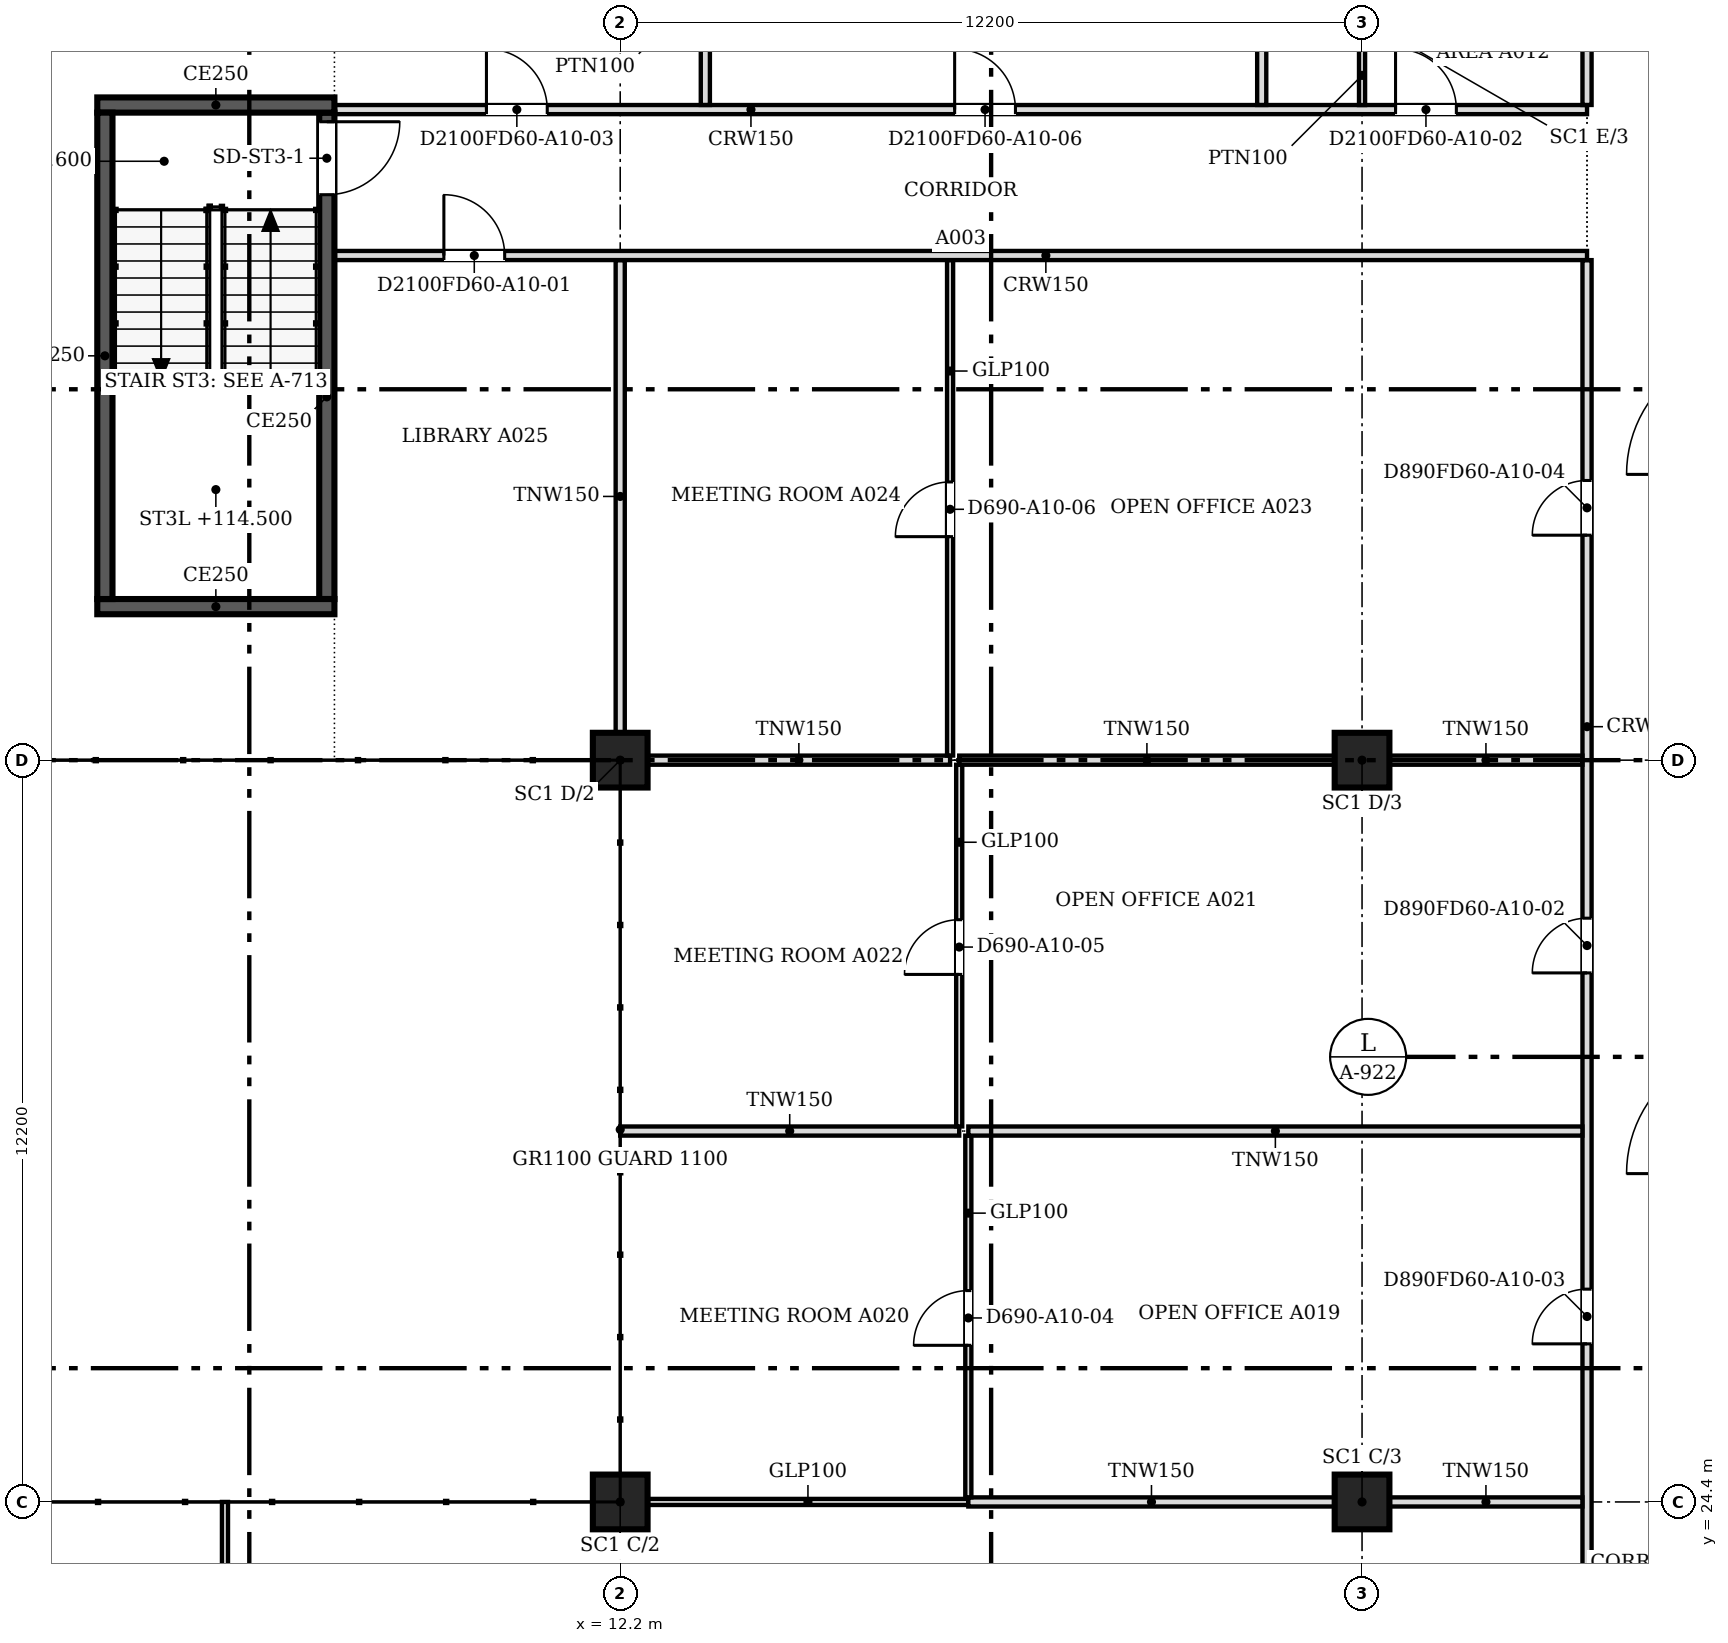
"""IFC4 building model, lengths in metres.
Left out: names, types, materials, properties, quantities, classifications, styles, units other than length and angle.
Written with IfcOpenShell. Run it as: python <this file> out.ifc"""

import sys

from ifc_helpers import new_model, si_unit, direction, frame, frame_2d, origin, origin_2d, place, context, subcontext, project, spatial, rectangle, extrude, source, transform, mapped, element, fill, save


model = new_model("IFC4")
c1 = context("Model", 3, precision=1e-05, world=origin(), true_north=direction((0.0, 1.0)))
c2 = subcontext(c1, "Body", "Model", "MODEL_VIEW")
j1 = project(units=[si_unit("LENGTHUNIT", "METRE"), si_unit("PLANEANGLEUNIT", "RADIAN")], contexts=[c1])
p1 = place(None, origin())
s1 = spatial("IfcSite", under=j1, at=p1, CompositionType="ELEMENT")
p2 = place(p1, origin())
s2 = spatial("IfcBuilding", under=s1, at=p2, CompositionType="ELEMENT")
p3 = place(p2, frame((0.0, 0.0, 112.6)))
s3 = spatial("IfcBuildingStorey", under=s2, at=p3, CompositionType="ELEMENT", Elevation=112.6)
for number, where, z_axis, x_axis in (
    (1, (12.2, 24.4, 0.0), (0.0, 0.0, 1.0), (1.0, 0.0, 0.0)),
    (2, (12.2, 36.6, 0.0), (0.0, 0.0, 1.0), (1.0, 0.0, 0.0)),
    (3, (24.4, 24.4, 0.0), (0.0, 0.0, 1.0), (1.0, 0.0, 0.0)),
    (4, (24.4, 36.6, 0.0), (0.0, 0.0, 1.0), (1.0, 0.0, 0.0)),
):
    element("IfcColumn", number, at=place(p3, frame(where, z_axis=z_axis, x_axis=x_axis)), inside=s3, PredefinedType="COLUMN", context=c2, shape_type="SweptSolid", body=[
        extrude(rectangle(XDim=0.9, YDim=0.9, at=origin_2d()), origin(), (0.0, 0.0, 1.0), 3.6),
    ])
p4 = place(p3, frame((7.5, 39.125, 0.0), z_axis=(0.0, 0.0, 1.0), x_axis=(-1.0, 0.0, 0.0)))
e5 = element("IfcWall", 5, at=p4, inside=s3, PredefinedType="SOLIDWALL", context=c2, shape_type="SweptSolid", body=[
    extrude(rectangle(XDim=3.9, YDim=0.25, at=frame_2d((1.95, 0.0))), origin(), (0.0, 0.0, 1.0), 3.8),
])
p5 = place(p3, frame((3.725, 39.25, 0.0), z_axis=(0.0, 0.0, 1.0), x_axis=(0.0, 1.0, 0.0)))
e6 = element("IfcWall", 6, at=p5, inside=s3, PredefinedType="SOLIDWALL", context=c2, shape_type="SweptSolid", body=[
    extrude(rectangle(XDim=8.0, YDim=0.25, at=frame_2d((4.0, 0.0))), origin(), (0.0, 0.0, 1.0), 3.8),
])
p6 = place(p3, frame((3.6, 47.375, 0.0), z_axis=(0.0, 0.0, 1.0), x_axis=(1.0, 0.0, 0.0)))
e7 = element("IfcWall", 7, at=p6, inside=s3, PredefinedType="SOLIDWALL", context=c2, shape_type="SweptSolid", body=[
    extrude(rectangle(XDim=3.9, YDim=0.25, at=frame_2d((1.95, 0.0))), origin(), (0.0, 0.0, 1.0), 3.8),
])
p7 = place(p3, frame((7.375, 47.25, 0.0), z_axis=(0.0, 0.0, 1.0), x_axis=(0.0, -1.0, 0.0)))
e8 = element("IfcWall", 8, at=p7, inside=s3, PredefinedType="SOLIDWALL", context=c2, shape_type="SweptSolid", body=[
    extrude(rectangle(XDim=8.0, YDim=0.25, at=frame_2d((4.0, 0.0))), origin(), (0.0, 0.0, 1.0), 3.8),
])
m1 = source(origin(), c2, "Body", "SweptSolid", [
    extrude(rectangle(XDim=1.2, YDim=2.1, at=frame_2d((0.6, 1.05))), frame((0.0, 0.135, 0.0), z_axis=(0.0, -1.0, 0.0), x_axis=(1.0, 0.0, 0.0)), (0.0, 0.0, 1.0), 0.27),
])
p8 = place(p7, frame((0.15, 0.0, 0.0)))
e9 = element("IfcOpeningElement", 9, at=p8, cuts=e8, PredefinedType="OPENING", context=c2, shape_type="MappedRepresentation", body=[
    mapped(m1, transform((0.0, 0.0, 0.0), scale=1.0)),
])
p9 = place(p3, frame((28.1, 18.8, 0.0), z_axis=(0.0, 0.0, 1.0), x_axis=(0.0, 1.0, 0.0)))
e10 = element("IfcWall", 10, at=p9, inside=s3, PredefinedType="PARTITIONING", context=c2, shape_type="SweptSolid", body=[
    extrude(rectangle(XDim=26.024, YDim=0.15, at=frame_2d((13.012, 0.0))), origin(), (0.0, 0.0, 1.0), 3.067),
])
m2 = source(origin(), c2, "Body", "SweptSolid", [
    extrude(rectangle(XDim=0.9, YDim=2.1, at=frame_2d((0.45, 1.05))), frame((0.0, 0.085, 0.0), z_axis=(0.0, -1.0, 0.0), x_axis=(1.0, 0.0, 0.0)), (0.0, 0.0, 1.0), 0.17),
])
p10 = place(p9, frame((1.1, 0.0, 0.0)))
e11 = element("IfcOpeningElement", 11, at=p10, cuts=e10, PredefinedType="OPENING", context=c2, shape_type="MappedRepresentation", body=[
    mapped(m2, transform((0.0, 0.0, 0.0), scale=1.0)),
])
p11 = place(p9, frame((14.301, 0.0, 0.0)))
e12 = element("IfcOpeningElement", 12, at=p11, cuts=e10, PredefinedType="OPENING", context=c2, shape_type="MappedRepresentation", body=[
    mapped(m2, transform((0.0, 0.0, 0.0), scale=1.0)),
])
p12 = place(p9, frame((8.2, 0.0, 0.0)))
e13 = element("IfcOpeningElement", 13, at=p12, cuts=e10, PredefinedType="OPENING", context=c2, shape_type="MappedRepresentation", body=[
    mapped(m2, transform((0.0, 0.0, 0.0), scale=1.0)),
])
p13 = place(p9, frame((21.5, 0.0, 0.0)))
e14 = element("IfcOpeningElement", 14, at=p13, cuts=e10, PredefinedType="OPENING", context=c2, shape_type="MappedRepresentation", body=[
    mapped(m2, transform((0.0, 0.0, 0.0), scale=1.0)),
])
p14 = place(p3, frame((5.7, 18.99, 0.0), z_axis=(0.0, 0.0, 1.0), x_axis=(0.0, 1.0, 0.0)))
e15 = element("IfcWall", 15, at=p14, inside=s3, PredefinedType="PARTITIONING", context=c2, shape_type="SweptSolid", body=[
    extrude(rectangle(XDim=5.41, YDim=0.1, at=frame_2d((2.705, 0.0))), origin(), (0.0, 0.0, 1.0), 3.067),
])
m3 = source(origin(), c2, "Body", "SweptSolid", [
    extrude(rectangle(XDim=0.9, YDim=2.1, at=frame_2d((0.45, 1.05))), frame((0.0, 0.06, 0.0), z_axis=(0.0, -1.0, 0.0), x_axis=(1.0, 0.0, 0.0)), (0.0, 0.0, 1.0), 0.12),
])
p15 = place(p14, frame((2.3, 0.0, 0.0)))
e16 = element("IfcOpeningElement", 16, at=p15, cuts=e15, PredefinedType="OPENING", context=c2, shape_type="MappedRepresentation", body=[
    mapped(m3, transform((0.0, 0.0, 0.0), scale=1.0)),
])
p16 = place(p3, frame((12.651, 24.4, 0.0), z_axis=(0.0, 0.0, 1.0), x_axis=(1.0, 0.0, 0.0)))
e17 = element("IfcWall", 17, at=p16, inside=s3, PredefinedType="PARTITIONING", context=c2, shape_type="SweptSolid", body=[
    extrude(rectangle(XDim=5.273, YDim=0.1, at=frame_2d((2.637, 0.0))), origin(), (0.0, 0.0, 1.0), 3.067),
])
p17 = place(p3, frame((17.925, 24.4, 0.0), z_axis=(0.0, 0.0, 1.0), x_axis=(1.0, 0.0, 0.0)))
e18 = element("IfcWall", 18, at=p17, inside=s3, PredefinedType="PARTITIONING", context=c2, shape_type="SweptSolid", body=[
    extrude(rectangle(XDim=6.024, YDim=0.15, at=frame_2d((3.012, 0.0))), origin(), (0.0, 0.0, 1.0), 3.067),
])
p18 = place(p3, frame((24.851, 24.4, 0.0), z_axis=(0.0, 0.0, 1.0), x_axis=(1.0, 0.0, 0.0)))
e19 = element("IfcWall", 19, at=p18, inside=s3, PredefinedType="PARTITIONING", context=c2, shape_type="SweptSolid", body=[
    extrude(rectangle(XDim=3.173, YDim=0.15, at=frame_2d((1.586, 0.0))), origin(), (0.0, 0.0, 1.0), 3.067),
])
p19 = place(p3, frame((17.925, 24.476, 0.0), z_axis=(0.0, 0.0, 1.0), x_axis=(0.0, 1.0, 0.0)))
e20 = element("IfcWall", 20, at=p19, inside=s3, PredefinedType="PARTITIONING", context=c2, shape_type="SweptSolid", body=[
    extrude(rectangle(XDim=5.948, YDim=0.1, at=frame_2d((2.974, 0.0))), origin(), (0.0, 0.0, 1.0), 3.067),
])
p20 = place(p19, frame((2.5, 0.0, 0.0)))
e21 = element("IfcOpeningElement", 21, at=p20, cuts=e20, PredefinedType="OPENING", context=c2, shape_type="MappedRepresentation", body=[
    mapped(m3, transform((0.0, 0.0, 0.0), scale=1.0)),
])
p21 = place(p3, frame((12.2, 30.5, 0.0), z_axis=(0.0, 0.0, 1.0), x_axis=(1.0, 0.0, 0.0)))
e22 = element("IfcWall", 22, at=p21, inside=s3, PredefinedType="PARTITIONING", context=c2, shape_type="SweptSolid", body=[
    extrude(rectangle(XDim=5.575, YDim=0.15, at=frame_2d((2.788, 0.0))), origin(), (0.0, 0.0, 1.0), 3.067),
])
p22 = place(p3, frame((17.925, 30.5, 0.0), z_axis=(0.0, 0.0, 1.0), x_axis=(1.0, 0.0, 0.0)))
e23 = element("IfcWall", 23, at=p22, inside=s3, PredefinedType="PARTITIONING", context=c2, shape_type="SweptSolid", body=[
    extrude(rectangle(XDim=10.099, YDim=0.15, at=frame_2d((5.049, 0.0))), origin(), (0.0, 0.0, 1.0), 3.067),
])
p23 = place(p3, frame((17.775, 30.576, 0.0), z_axis=(0.0, 0.0, 1.0), x_axis=(0.0, 1.0, 0.0)))
e24 = element("IfcWall", 24, at=p23, inside=s3, PredefinedType="PARTITIONING", context=c2, shape_type="SweptSolid", body=[
    extrude(rectangle(XDim=5.948, YDim=0.1, at=frame_2d((2.974, 0.0))), origin(), (0.0, 0.0, 1.0), 3.067),
])
p24 = place(p23, frame((2.5, 0.0, 0.0)))
e25 = element("IfcOpeningElement", 25, at=p24, cuts=e24, PredefinedType="OPENING", context=c2, shape_type="MappedRepresentation", body=[
    mapped(m3, transform((0.0, 0.0, 0.0), scale=1.0)),
])
p25 = place(p3, frame((12.651, 36.6, 0.0), z_axis=(0.0, 0.0, 1.0), x_axis=(1.0, 0.0, 0.0)))
e26 = element("IfcWall", 26, at=p25, inside=s3, PredefinedType="PARTITIONING", context=c2, shape_type="SweptSolid", body=[
    extrude(rectangle(XDim=4.974, YDim=0.15, at=frame_2d((2.487, 0.0))), origin(), (0.0, 0.0, 1.0), 3.067),
])
p26 = place(p3, frame((17.775, 36.6, 0.0), z_axis=(0.0, 0.0, 1.0), x_axis=(1.0, 0.0, 0.0)))
e27 = element("IfcWall", 27, at=p26, inside=s3, PredefinedType="PARTITIONING", context=c2, shape_type="SweptSolid", body=[
    extrude(rectangle(XDim=6.174, YDim=0.15, at=frame_2d((3.087, 0.0))), origin(), (0.0, 0.0, 1.0), 3.067),
])
p27 = place(p3, frame((24.851, 36.6, 0.0), z_axis=(0.0, 0.0, 1.0), x_axis=(1.0, 0.0, 0.0)))
e28 = element("IfcWall", 28, at=p27, inside=s3, PredefinedType="PARTITIONING", context=c2, shape_type="SweptSolid", body=[
    extrude(rectangle(XDim=3.173, YDim=0.15, at=frame_2d((1.586, 0.0))), origin(), (0.0, 0.0, 1.0), 3.067),
])
p28 = place(p3, frame((17.625, 36.676, 0.0), z_axis=(0.0, 0.0, 1.0), x_axis=(0.0, 1.0, 0.0)))
e29 = element("IfcWall", 29, at=p28, inside=s3, PredefinedType="PARTITIONING", context=c2, shape_type="SweptSolid", body=[
    extrude(rectangle(XDim=8.148, YDim=0.1, at=frame_2d((4.074, 0.0))), origin(), (0.0, 0.0, 1.0), 3.067),
])
p29 = place(p28, frame((3.6, 0.0, 0.0)))
e30 = element("IfcOpeningElement", 30, at=p29, cuts=e29, PredefinedType="OPENING", context=c2, shape_type="MappedRepresentation", body=[
    mapped(m3, transform((0.0, 0.0, 0.0), scale=1.0)),
])
p30 = place(p3, frame((12.2, 37.051, 0.0), z_axis=(0.0, 0.0, 1.0), x_axis=(0.0, 1.0, 0.0)))
e31 = element("IfcWall", 31, at=p30, inside=s3, PredefinedType="PARTITIONING", context=c2, shape_type="SweptSolid", body=[
    extrude(rectangle(XDim=7.773, YDim=0.15, at=frame_2d((3.886, 0.0))), origin(), (0.0, 0.0, 1.0), 3.067),
])
p31 = place(p3, frame((28.1, 44.9, 0.0), z_axis=(0.0, 0.0, 1.0), x_axis=(-1.0, 0.0, 0.0)))
e32 = element("IfcWall", 32, at=p31, inside=s3, PredefinedType="PARTITIONING", context=c2, shape_type="SweptSolid", body=[
    extrude(rectangle(XDim=20.6, YDim=0.15, at=frame_2d((10.3, 0.0))), origin(), (0.0, 0.0, 1.0), 3.067),
])
m4 = source(origin(), c2, "Body", "SweptSolid", [
    extrude(rectangle(XDim=1.0, YDim=2.1, at=frame_2d((0.5, 1.05))), frame((0.0, 0.085, 0.0), z_axis=(0.0, -1.0, 0.0), x_axis=(1.0, 0.0, 0.0)), (0.0, 0.0, 1.0), 0.17),
])
p32 = place(p31, frame((17.8, 0.0, 0.0)))
e33 = element("IfcOpeningElement", 33, at=p32, cuts=e32, PredefinedType="OPENING", context=c2, shape_type="MappedRepresentation", body=[
    mapped(m4, transform((0.0, 0.0, 0.0), scale=1.0)),
])
p33 = place(p3, frame((7.5, 47.3, 0.0), z_axis=(0.0, 0.0, 1.0), x_axis=(1.0, 0.0, 0.0)))
e34 = element("IfcWall", 34, at=p33, inside=s3, PredefinedType="PARTITIONING", context=c2, shape_type="SweptSolid", body=[
    extrude(rectangle(XDim=20.6, YDim=0.15, at=frame_2d((10.3, 0.0))), origin(), (0.0, 0.0, 1.0), 3.067),
])
p34 = place(p33, frame((17.451, 0.0, 0.0)))
e35 = element("IfcOpeningElement", 35, at=p34, cuts=e34, PredefinedType="OPENING", context=c2, shape_type="MappedRepresentation", body=[
    mapped(m4, transform((0.0, 0.0, 0.0), scale=1.0)),
])
p35 = place(p33, frame((2.5, 0.0, 0.0)))
e36 = element("IfcOpeningElement", 36, at=p35, cuts=e34, PredefinedType="OPENING", context=c2, shape_type="MappedRepresentation", body=[
    mapped(m4, transform((0.0, 0.0, 0.0), scale=1.0)),
])
p36 = place(p33, frame((10.2, 0.0, 0.0)))
e37 = element("IfcOpeningElement", 37, at=p36, cuts=e34, PredefinedType="OPENING", context=c2, shape_type="MappedRepresentation", body=[
    mapped(m4, transform((0.0, 0.0, 0.0), scale=1.0)),
])
p37 = place(p3, frame((13.6, 47.376, 0.0), z_axis=(0.0, 0.0, 1.0), x_axis=(0.0, 1.0, 0.0)))
e38 = element("IfcWall", 38, at=p37, inside=s3, PredefinedType="PARTITIONING", context=c2, shape_type="SweptSolid", body=[
    extrude(rectangle(XDim=3.498, YDim=0.15, at=frame_2d((1.749, 0.0))), origin(), (0.0, 0.0, 1.0), 3.067),
])
p38 = place(p3, frame((22.75, 47.376, 0.0), z_axis=(0.0, 0.0, 1.0), x_axis=(0.0, 1.0, 0.0)))
e39 = element("IfcWall", 39, at=p38, inside=s3, PredefinedType="PARTITIONING", context=c2, shape_type="SweptSolid", body=[
    extrude(rectangle(XDim=2.948, YDim=0.15, at=frame_2d((1.474, 0.0))), origin(), (0.0, 0.0, 1.0), 3.067),
])
p39 = place(p3, frame((28.1, 47.376, 0.0), z_axis=(0.0, 0.0, 1.0), x_axis=(0.0, 1.0, 0.0)))
e40 = element("IfcWall", 40, at=p39, inside=s3, PredefinedType="PARTITIONING", context=c2, shape_type="SweptSolid", body=[
    extrude(rectangle(XDim=3.748, YDim=0.15, at=frame_2d((1.874, 0.0))), origin(), (0.0, 0.0, 1.0), 3.067),
])
p40 = place(p3, frame((24.4, 48.35, 0.0), z_axis=(0.0, 0.0, 1.0), x_axis=(0.0, -1.0, 0.0)))
e41 = element("IfcWall", 41, at=p40, inside=s3, PredefinedType="PARTITIONING", context=c2, shape_type="SweptSolid", body=[
    extrude(rectangle(XDim=0.975, YDim=0.1, at=frame_2d((0.488, 0.0))), origin(), (0.0, 0.0, 1.0), 3.067),
])
m5 = source(origin(), c2, "Body", "SweptSolid", [
    extrude(rectangle(XDim=1.2, YDim=2.1, at=frame_2d((0.6, 1.05))), frame((0.0, 0.025, 0.0), z_axis=(0.0, -1.0, 0.0), x_axis=(1.0, 0.0, 0.0)), (0.0, 0.0, 1.0), 0.05),
])
p41 = place(p8, origin())
e42 = element("IfcDoor", 42, at=p41, inside=s3, OperationType="SINGLE_SWING_LEFT", PredefinedType="DOOR", context=c2, shape_type="MappedRepresentation", body=[
    mapped(m5, transform((0.0, 0.0, 0.0), scale=1.0)),
])
fill(e9, e42)
m6 = source(origin(), c2, "Body", "SweptSolid", [
    extrude(rectangle(XDim=1.0, YDim=2.1, at=frame_2d((0.5, 1.05))), frame((0.0, 0.025, 0.0), z_axis=(0.0, -1.0, 0.0), x_axis=(1.0, 0.0, 0.0)), (0.0, 0.0, 1.0), 0.05),
])
p42 = place(p32, origin())
e43 = element("IfcDoor", 43, at=p42, inside=s3, OperationType="SINGLE_SWING_RIGHT", PredefinedType="DOOR", context=c2, shape_type="MappedRepresentation", body=[
    mapped(m6, transform((0.0, 0.0, 0.0), scale=1.0)),
])
fill(e33, e43)
p43 = place(p34, origin())
e44 = element("IfcDoor", 44, at=p43, inside=s3, OperationType="SINGLE_SWING_LEFT", PredefinedType="DOOR", context=c2, shape_type="MappedRepresentation", body=[
    mapped(m6, transform((0.0, 0.0, 0.0), scale=1.0)),
])
fill(e35, e44)
m7 = source(origin(), c2, "Body", "SweptSolid", [
    extrude(rectangle(XDim=0.9, YDim=2.1, at=frame_2d((0.45, 1.05))), frame((0.0, 0.025, 0.0), z_axis=(0.0, -1.0, 0.0), x_axis=(1.0, 0.0, 0.0)), (0.0, 0.0, 1.0), 0.05),
])
p44 = place(p20, origin())
e45 = element("IfcDoor", 45, at=p44, inside=s3, OperationType="SINGLE_SWING_LEFT", PredefinedType="DOOR", context=c2, shape_type="MappedRepresentation", body=[
    mapped(m7, transform((0.0, 0.0, 0.0), scale=1.0)),
])
fill(e21, e45)
p45 = place(p24, origin())
e46 = element("IfcDoor", 46, at=p45, inside=s3, OperationType="SINGLE_SWING_LEFT", PredefinedType="DOOR", context=c2, shape_type="MappedRepresentation", body=[
    mapped(m7, transform((0.0, 0.0, 0.0), scale=1.0)),
])
fill(e25, e46)
p46 = place(p11, origin())
e47 = element("IfcDoor", 47, at=p46, inside=s3, OperationType="SINGLE_SWING_LEFT", PredefinedType="DOOR", context=c2, shape_type="MappedRepresentation", body=[
    mapped(m7, transform((0.0, 0.0, 0.0), scale=1.0)),
])
fill(e12, e47)
p47 = place(p35, origin())
e48 = element("IfcDoor", 48, at=p47, inside=s3, OperationType="SINGLE_SWING_LEFT", PredefinedType="DOOR", context=c2, shape_type="MappedRepresentation", body=[
    mapped(m6, transform((0.0, 0.0, 0.0), scale=1.0)),
])
fill(e36, e48)
p48 = place(p12, origin())
e49 = element("IfcDoor", 49, at=p48, inside=s3, OperationType="SINGLE_SWING_LEFT", PredefinedType="DOOR", context=c2, shape_type="MappedRepresentation", body=[
    mapped(m7, transform((0.0, 0.0, 0.0), scale=1.0)),
])
fill(e13, e49)
p49 = place(p29, origin())
e50 = element("IfcDoor", 50, at=p49, inside=s3, OperationType="SINGLE_SWING_LEFT", PredefinedType="DOOR", context=c2, shape_type="MappedRepresentation", body=[
    mapped(m7, transform((0.0, 0.0, 0.0), scale=1.0)),
])
fill(e30, e50)
p50 = place(p13, origin())
e51 = element("IfcDoor", 51, at=p50, inside=s3, OperationType="SINGLE_SWING_LEFT", PredefinedType="DOOR", context=c2, shape_type="MappedRepresentation", body=[
    mapped(m7, transform((0.0, 0.0, 0.0), scale=1.0)),
])
fill(e14, e51)
p51 = place(p36, origin())
e52 = element("IfcDoor", 52, at=p51, inside=s3, OperationType="SINGLE_SWING_LEFT", PredefinedType="DOOR", context=c2, shape_type="MappedRepresentation", body=[
    mapped(m6, transform((0.0, 0.0, 0.0), scale=1.0)),
])
fill(e37, e52)
save(model, sys.argv[1])
